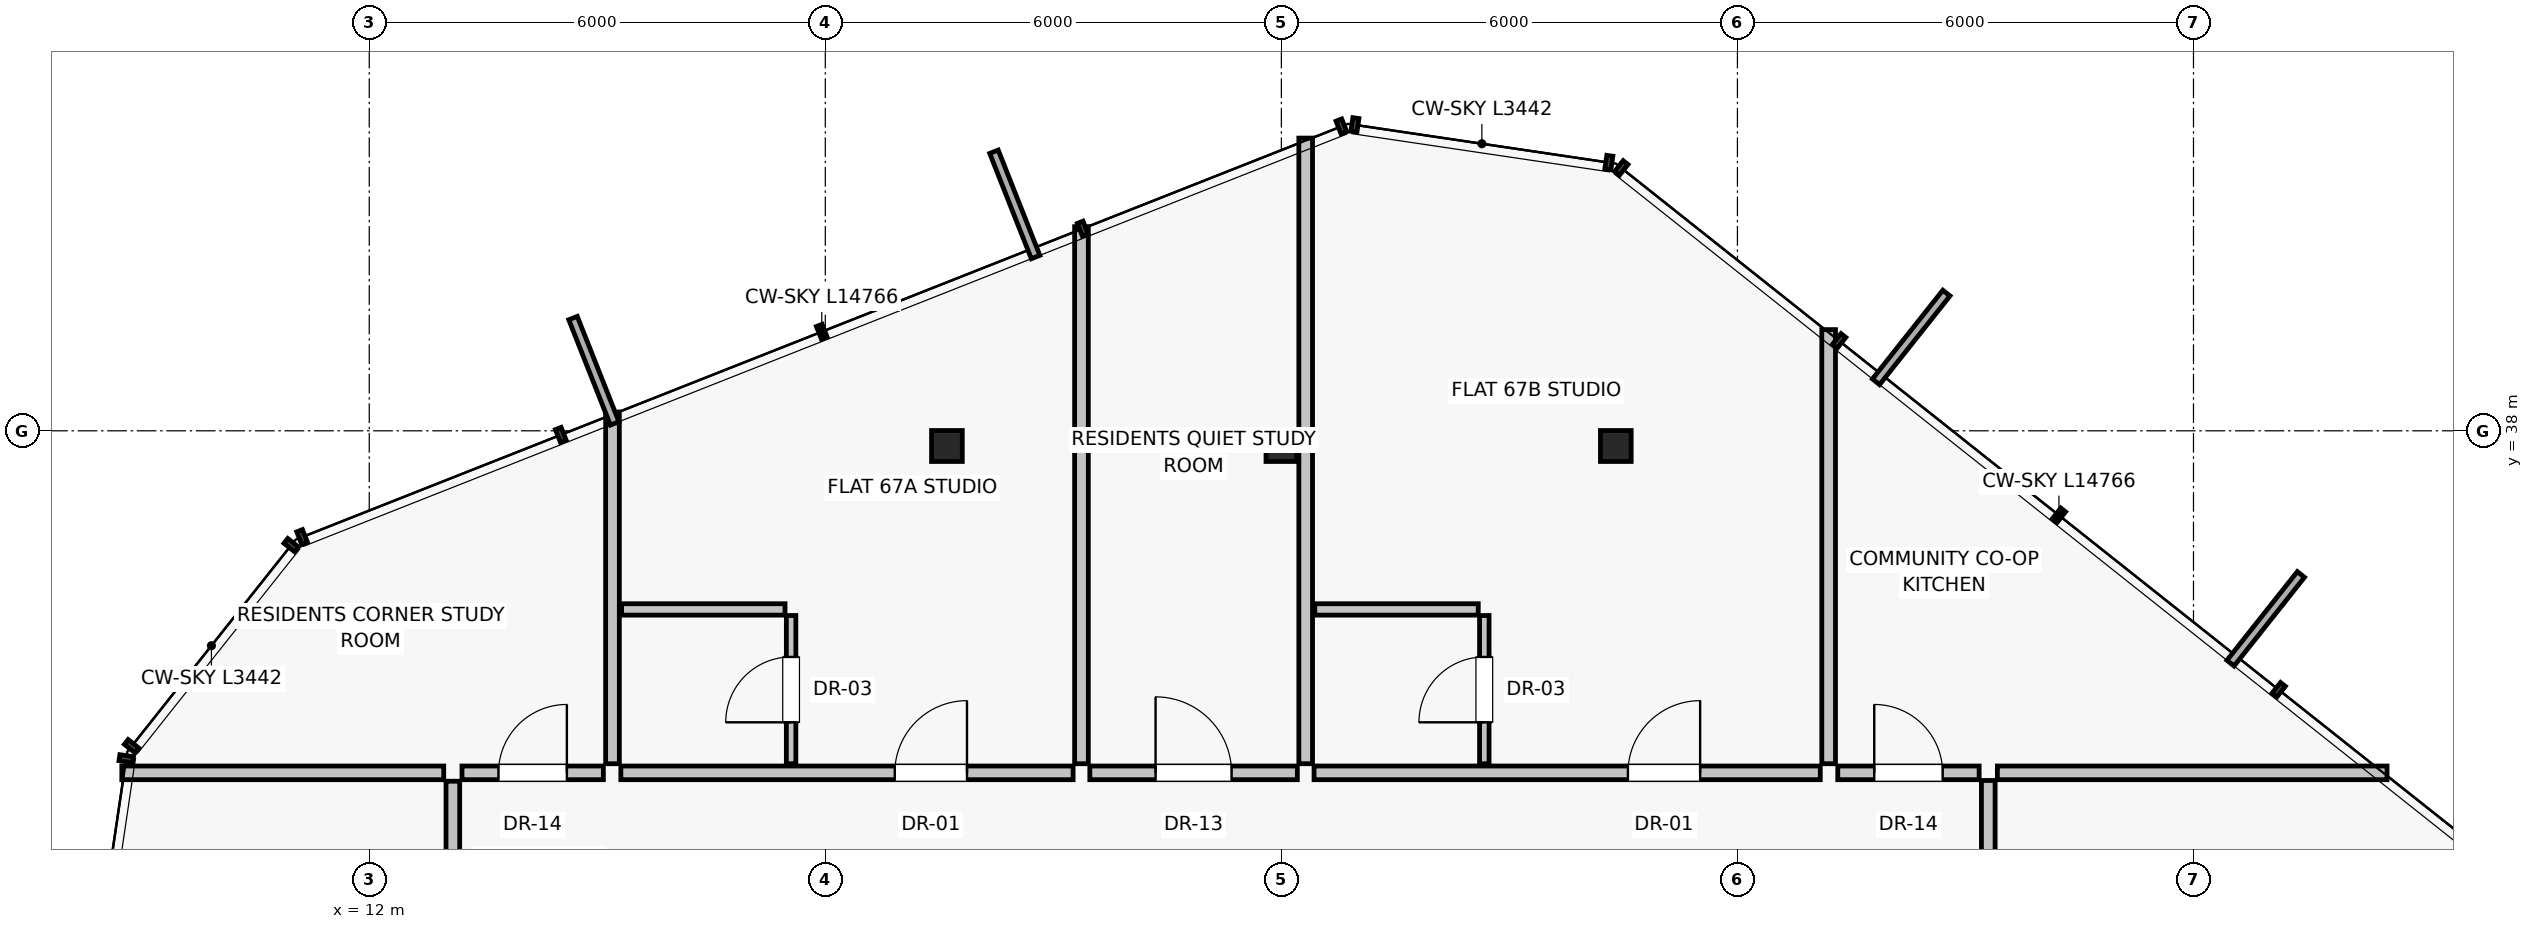
"""IFC4 building model, lengths in metres.
Left out: names, types, materials, properties, quantities, classifications, styles, units other than length and angle.
Written with IfcOpenShell. Run it as: python <this file> out.ifc"""

import sys

from ifc_helpers import new_model, si_unit, direction, frame, frame_2d, origin, origin_2d, place, context, subcontext, project, spatial, rectangle, i_section, extrude, source, transform, mapped, element, fill, save


model = new_model("IFC4")
c1 = context("Model", 3, precision=1e-05, world=origin(), true_north=direction((0.0, 1.0)))
c2 = subcontext(c1, "Body", "Model", "MODEL_VIEW")
j1 = project(units=[si_unit("LENGTHUNIT", "METRE"), si_unit("PLANEANGLEUNIT", "RADIAN")], contexts=[c1])
p1 = place(None, origin())
s1 = spatial("IfcSite", under=j1, at=p1, CompositionType="ELEMENT")
p2 = place(p1, origin())
s2 = spatial("IfcBuilding", under=s1, at=p2, CompositionType="ELEMENT")
p3 = place(p2, frame((0.0, 0.0, 236.55)))
s3 = spatial("IfcBuildingStorey", under=s2, at=p3, CompositionType="ELEMENT", Elevation=236.55)
for number, where, z_axis, x_axis in (
    (1, (28.4, 37.8, 0.0), (0.0, 0.0, 1.0), (1.0, 0.0, 0.0)),
    (2, (24.0, 37.8, 0.0), (0.0, 0.0, 1.0), (1.0, 0.0, 0.0)),
    (3, (19.6, 37.8, 0.0), (0.0, 0.0, 1.0), (1.0, 0.0, 0.0)),
):
    element("IfcColumn", number, at=place(p3, frame(where, z_axis=z_axis, x_axis=x_axis)), inside=s3, PredefinedType="COLUMN", context=c2, shape_type="SweptSolid", body=[
        extrude(i_section(OverallWidth=0.404, OverallDepth=0.407, WebThickness=0.025, FlangeThickness=0.04, at=origin_2d()), origin(), (0.0, 0.0, 1.0), 4.1),
    ])
p4 = place(p3, frame((15.2, 33.62, 0.0), z_axis=(0.0, 0.0, 1.0), x_axis=(0.0, 1.0, 0.0)))
e4 = element("IfcWall", 4, at=p4, inside=s3, PredefinedType="PARTITIONING", context=c2, shape_type="SweptSolid", body=[
    extrude(rectangle(XDim=4.627, YDim=0.18, at=frame_2d((2.314, 0.0))), origin(), (0.0, 0.0, 1.0), 3.865),
])
p5 = place(p3, frame((31.2, 33.62, 0.0), z_axis=(0.0, 0.0, 1.0), x_axis=(0.0, 1.0, 0.0)))
e5 = element("IfcWall", 5, at=p5, inside=s3, PredefinedType="PARTITIONING", context=c2, shape_type="SweptSolid", body=[
    extrude(rectangle(XDim=5.711, YDim=0.18, at=frame_2d((2.855, 0.0))), origin(), (0.0, 0.0, 1.0), 3.865),
])
p6 = place(p3, frame((21.48, 33.5, 0.0), z_axis=(0.0, 0.0, 1.0), x_axis=(1.0, 0.0, 0.0)))
e6 = element("IfcWall", 6, at=p6, inside=s3, PredefinedType="PARTITIONING", context=c2, shape_type="SweptSolid", body=[
    extrude(rectangle(XDim=2.73, YDim=0.18, at=frame_2d((1.365, 0.0))), origin(), (0.0, 0.0, 1.0), 3.865),
])
p7 = place(p6, frame((0.865, 0.0, 0.0)))
e7 = element("IfcOpeningElement", 7, at=p7, cuts=e6, PredefinedType="OPENING", context=c2, shape_type="SweptSolid", body=[
    extrude(rectangle(XDim=1.0, YDim=2.01, at=frame_2d((0.5, 1.005))), frame((0.0, 0.1, 0.0), z_axis=(0.0, -1.0, 0.0), x_axis=(1.0, 0.0, 0.0)), (0.0, 0.0, 1.0), 0.2),
])
p8 = place(p3, frame((21.37, 33.62, 0.0), z_axis=(0.0, 0.0, 1.0), x_axis=(0.0, 1.0, 0.0)))
e8 = element("IfcWall", 8, at=p8, inside=s3, PredefinedType="PARTITIONING", context=c2, shape_type="SweptSolid", body=[
    extrude(rectangle(XDim=7.065, YDim=0.18, at=frame_2d((3.533, 0.0))), origin(), (0.0, 0.0, 1.0), 3.865),
])
p9 = place(p3, frame((15.31, 33.5, 0.0), z_axis=(0.0, 0.0, 1.0), x_axis=(1.0, 0.0, 0.0)))
e9 = element("IfcWall", 9, at=p9, inside=s3, PredefinedType="PARTITIONING", context=c2, shape_type="SweptSolid", body=[
    extrude(rectangle(XDim=5.95, YDim=0.18, at=frame_2d((2.975, 0.0))), origin(), (0.0, 0.0, 1.0), 3.865),
])
p10 = place(p9, frame((3.604, 0.0, 0.0)))
e10 = element("IfcOpeningElement", 10, at=p10, cuts=e9, PredefinedType="OPENING", context=c2, shape_type="SweptSolid", body=[
    extrude(rectangle(XDim=0.95, YDim=2.02, at=frame_2d((0.475, 1.01))), frame((0.0, 0.1, 0.0), z_axis=(0.0, -1.0, 0.0), x_axis=(1.0, 0.0, 0.0)), (0.0, 0.0, 1.0), 0.2),
])
p11 = place(p3, frame((17.55, 33.62, 0.0), z_axis=(0.0, 0.0, 1.0), x_axis=(0.0, 1.0, 0.0)))
e11 = element("IfcWall", 11, at=p11, inside=s3, PredefinedType="PARTITIONING", context=c2, shape_type="SweptSolid", body=[
    extrude(rectangle(XDim=1.95, YDim=0.125, at=frame_2d((0.975, 0.0))), origin(), (0.0, 0.0, 1.0), 3.865),
])
p12 = place(p11, frame((0.545, 0.0, 0.0)))
e12 = element("IfcOpeningElement", 12, at=p12, cuts=e11, PredefinedType="OPENING", context=c2, shape_type="SweptSolid", body=[
    extrude(rectangle(XDim=0.86, YDim=2.01, at=frame_2d((0.43, 1.005))), frame((0.0, 0.073, 0.0), z_axis=(0.0, -1.0, 0.0), x_axis=(1.0, 0.0, 0.0)), (0.0, 0.0, 1.0), 0.145),
])
p13 = place(p3, frame((15.32, 35.65, 0.0), z_axis=(0.0, 0.0, 1.0), x_axis=(1.0, 0.0, 0.0)))
e13 = element("IfcWall", 13, at=p13, inside=s3, PredefinedType="PARTITIONING", context=c2, shape_type="SweptSolid", body=[
    extrude(rectangle(XDim=2.15, YDim=0.15, at=frame_2d((1.075, 0.0))), origin(), (0.0, 0.0, 1.0), 3.865),
])
p14 = place(p3, frame((24.32, 33.62, 0.0), z_axis=(0.0, 0.0, 1.0), x_axis=(0.0, 1.0, 0.0)))
e14 = element("IfcWall", 14, at=p14, inside=s3, PredefinedType="PARTITIONING", context=c2, shape_type="SweptSolid", body=[
    extrude(rectangle(XDim=8.231, YDim=0.18, at=frame_2d((4.115, 0.0))), origin(), (0.0, 0.0, 1.0), 3.865),
])
p15 = place(p3, frame((24.43, 33.5, 0.0), z_axis=(0.0, 0.0, 1.0), x_axis=(1.0, 0.0, 0.0)))
e15 = element("IfcWall", 15, at=p15, inside=s3, PredefinedType="PARTITIONING", context=c2, shape_type="SweptSolid", body=[
    extrude(rectangle(XDim=6.66, YDim=0.18, at=frame_2d((3.33, 0.0))), origin(), (0.0, 0.0, 1.0), 3.865),
])
p16 = place(p15, frame((4.129, 0.0, 0.0)))
e16 = element("IfcOpeningElement", 16, at=p16, cuts=e15, PredefinedType="OPENING", context=c2, shape_type="SweptSolid", body=[
    extrude(rectangle(XDim=0.95, YDim=2.02, at=frame_2d((0.475, 1.01))), frame((0.0, 0.1, 0.0), z_axis=(0.0, -1.0, 0.0), x_axis=(1.0, 0.0, 0.0)), (0.0, 0.0, 1.0), 0.2),
])
p17 = place(p3, frame((26.67, 33.62, 0.0), z_axis=(0.0, 0.0, 1.0), x_axis=(0.0, 1.0, 0.0)))
e17 = element("IfcWall", 17, at=p17, inside=s3, PredefinedType="PARTITIONING", context=c2, shape_type="SweptSolid", body=[
    extrude(rectangle(XDim=1.95, YDim=0.125, at=frame_2d((0.975, 0.0))), origin(), (0.0, 0.0, 1.0), 3.865),
])
p18 = place(p17, frame((0.545, 0.0, 0.0)))
e18 = element("IfcOpeningElement", 18, at=p18, cuts=e17, PredefinedType="OPENING", context=c2, shape_type="SweptSolid", body=[
    extrude(rectangle(XDim=0.86, YDim=2.01, at=frame_2d((0.43, 1.005))), frame((0.0, 0.073, 0.0), z_axis=(0.0, -1.0, 0.0), x_axis=(1.0, 0.0, 0.0)), (0.0, 0.0, 1.0), 0.145),
])
p19 = place(p3, frame((24.44, 35.65, 0.0), z_axis=(0.0, 0.0, 1.0), x_axis=(1.0, 0.0, 0.0)))
e19 = element("IfcWall", 19, at=p19, inside=s3, PredefinedType="PARTITIONING", context=c2, shape_type="SweptSolid", body=[
    extrude(rectangle(XDim=2.15, YDim=0.15, at=frame_2d((1.075, 0.0))), origin(), (0.0, 0.0, 1.0), 3.865),
])
p20 = place(p3, frame((12.98, 33.5, 0.0), z_axis=(0.0, 0.0, 1.0), x_axis=(-1.0, 0.0, 0.0)))
e20 = element("IfcWall", 20, at=p20, inside=s3, PredefinedType="PARTITIONING", context=c2, shape_type="SweptSolid", body=[
    extrude(rectangle(XDim=4.235, YDim=0.18, at=frame_2d((2.118, 0.0))), origin(), (0.0, 0.0, 1.0), 3.865),
])
p21 = place(p3, frame((13.1, 24.11, 0.0), z_axis=(0.0, 0.0, 1.0), x_axis=(0.0, 1.0, 0.0)))
e21 = element("IfcWall", 21, at=p21, inside=s3, PredefinedType="PARTITIONING", context=c2, shape_type="SweptSolid", body=[
    extrude(rectangle(XDim=9.28, YDim=0.18, at=frame_2d((4.64, 0.0))), origin(), (0.0, 0.0, 1.0), 3.512),
])
p22 = place(p21, frame((4.14, 0.0, 0.0)))
e22 = element("IfcOpeningElement", 22, at=p22, cuts=e21, PredefinedType="OPENING", context=c2, shape_type="SweptSolid", body=[
    extrude(rectangle(XDim=1.0, YDim=2.01, at=frame_2d((0.5, 1.005))), frame((0.0, 0.1, 0.0), z_axis=(0.0, -1.0, 0.0), x_axis=(1.0, 0.0, 0.0)), (0.0, 0.0, 1.0), 0.2),
])
p23 = place(p3, frame((33.3, 31.5, 0.0), z_axis=(0.0, 0.0, 1.0), x_axis=(0.0, 1.0, 0.0)))
e23 = element("IfcWall", 23, at=p23, inside=s3, PredefinedType="PARTITIONING", context=c2, shape_type="SweptSolid", body=[
    extrude(rectangle(XDim=1.9, YDim=0.18, at=frame_2d((0.95, 0.0))), origin(), (0.0, 0.0, 1.0), 3.865),
])
p24 = place(p3, frame((13.22, 33.5, 0.0), z_axis=(0.0, 0.0, 1.0), x_axis=(1.0, 0.0, 0.0)))
e24 = element("IfcWall", 24, at=p24, inside=s3, PredefinedType="PARTITIONING", context=c2, shape_type="SweptSolid", body=[
    extrude(rectangle(XDim=1.86, YDim=0.18, at=frame_2d((0.93, 0.0))), origin(), (0.0, 0.0, 1.0), 3.865),
])
p25 = place(p24, frame((0.48, 0.0, 0.0)))
e25 = element("IfcOpeningElement", 25, at=p25, cuts=e24, PredefinedType="OPENING", context=c2, shape_type="SweptSolid", body=[
    extrude(rectangle(XDim=0.9, YDim=2.01, at=frame_2d((0.45, 1.005))), frame((0.0, 0.1, 0.0), z_axis=(0.0, -1.0, 0.0), x_axis=(1.0, 0.0, 0.0)), (0.0, 0.0, 1.0), 0.2),
])
p26 = place(p3, frame((33.42, 33.5, 0.0), z_axis=(0.0, 0.0, 1.0), x_axis=(1.0, 0.0, 0.0)))
e26 = element("IfcWall", 26, at=p26, inside=s3, PredefinedType="PARTITIONING", context=c2, shape_type="SweptSolid", body=[
    extrude(rectangle(XDim=5.126, YDim=0.18, at=frame_2d((2.563, 0.0))), origin(), (0.0, 0.0, 1.0), 3.865),
])
p27 = place(p3, frame((31.32, 33.5, 0.0), z_axis=(0.0, 0.0, 1.0), x_axis=(1.0, 0.0, 0.0)))
e27 = element("IfcWall", 27, at=p27, inside=s3, PredefinedType="PARTITIONING", context=c2, shape_type="SweptSolid", body=[
    extrude(rectangle(XDim=1.86, YDim=0.18, at=frame_2d((0.93, 0.0))), origin(), (0.0, 0.0, 1.0), 3.865),
])
p28 = place(p27, frame((0.48, 0.0, 0.0)))
e28 = element("IfcOpeningElement", 28, at=p28, cuts=e27, PredefinedType="OPENING", context=c2, shape_type="SweptSolid", body=[
    extrude(rectangle(XDim=0.9, YDim=2.01, at=frame_2d((0.45, 1.005))), frame((0.0, 0.1, 0.0), z_axis=(0.0, -1.0, 0.0), x_axis=(1.0, 0.0, 0.0)), (0.0, 0.0, 1.0), 0.2),
])
m1 = source(origin(), c2, "Body", "SweptSolid", [
    extrude(rectangle(XDim=1.0, YDim=2.01, at=frame_2d((0.5, 1.005))), frame((0.0, 0.025, 0.0), z_axis=(0.0, -1.0, 0.0), x_axis=(1.0, 0.0, 0.0)), (0.0, 0.0, 1.0), 0.05),
])
p29 = place(p7, origin())
e29 = element("IfcDoor", 29, at=p29, inside=s3, OperationType="SINGLE_SWING_LEFT", PredefinedType="DOOR", context=c2, shape_type="MappedRepresentation", body=[
    mapped(m1, transform((0.0, 0.0, 0.0), scale=1.0)),
])
fill(e7, e29)
m2 = source(origin(), c2, "Body", "SweptSolid", [
    extrude(rectangle(XDim=0.95, YDim=2.02, at=frame_2d((0.475, 1.01))), frame((0.0, 0.025, 0.0), z_axis=(0.0, -1.0, 0.0), x_axis=(1.0, 0.0, 0.0)), (0.0, 0.0, 1.0), 0.05),
])
p30 = place(p10, origin())
e30 = element("IfcDoor", 30, at=p30, inside=s3, OperationType="SINGLE_SWING_RIGHT", PredefinedType="DOOR", context=c2, shape_type="MappedRepresentation", body=[
    mapped(m2, transform((0.0, 0.0, 0.0), scale=1.0)),
])
fill(e10, e30)
m3 = source(origin(), c2, "Body", "SweptSolid", [
    extrude(rectangle(XDim=0.86, YDim=2.01, at=frame_2d((0.43, 1.005))), frame((0.0, 0.025, 0.0), z_axis=(0.0, -1.0, 0.0), x_axis=(1.0, 0.0, 0.0)), (0.0, 0.0, 1.0), 0.05),
])
p31 = place(p12, origin())
e31 = element("IfcDoor", 31, at=p31, inside=s3, OperationType="SINGLE_SWING_LEFT", PredefinedType="DOOR", context=c2, shape_type="MappedRepresentation", body=[
    mapped(m3, transform((0.0, 0.0, 0.0), scale=1.0)),
])
fill(e12, e31)
p32 = place(p16, origin())
e32 = element("IfcDoor", 32, at=p32, inside=s3, OperationType="SINGLE_SWING_RIGHT", PredefinedType="DOOR", context=c2, shape_type="MappedRepresentation", body=[
    mapped(m2, transform((0.0, 0.0, 0.0), scale=1.0)),
])
fill(e16, e32)
p33 = place(p18, origin())
e33 = element("IfcDoor", 33, at=p33, inside=s3, OperationType="SINGLE_SWING_LEFT", PredefinedType="DOOR", context=c2, shape_type="MappedRepresentation", body=[
    mapped(m3, transform((0.0, 0.0, 0.0), scale=1.0)),
])
fill(e18, e33)
m4 = source(origin(), c2, "Body", "SweptSolid", [
    extrude(rectangle(XDim=0.9, YDim=2.01, at=frame_2d((0.45, 1.005))), frame((0.0, 0.025, 0.0), z_axis=(0.0, -1.0, 0.0), x_axis=(1.0, 0.0, 0.0)), (0.0, 0.0, 1.0), 0.05),
])
p34 = place(p25, origin())
e34 = element("IfcDoor", 34, at=p34, inside=s3, OperationType="SINGLE_SWING_RIGHT", PredefinedType="DOOR", context=c2, shape_type="MappedRepresentation", body=[
    mapped(m4, transform((0.0, 0.0, 0.0), scale=1.0)),
])
fill(e25, e34)
p35 = place(p28, origin())
e35 = element("IfcDoor", 35, at=p35, inside=s3, OperationType="SINGLE_SWING_LEFT", PredefinedType="DOOR", context=c2, shape_type="MappedRepresentation", body=[
    mapped(m4, transform((0.0, 0.0, 0.0), scale=1.0)),
])
fill(e28, e35)
save(model, sys.argv[1])
